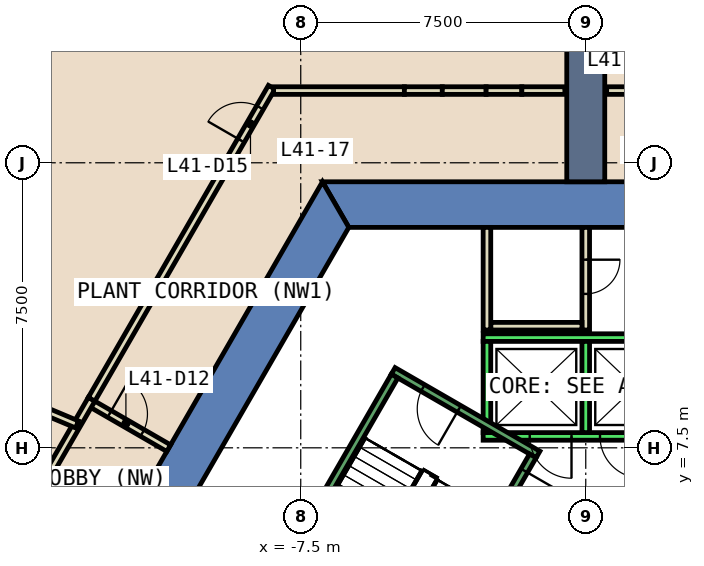
"""IFC4 building model, lengths in metres.
Left out: names, types, materials, properties, quantities, classifications, styles, units other than length and angle.
Written with IfcOpenShell. Run it as: python <this file> out.ifc"""

import sys

from ifc_helpers import new_model, si_unit, direction, frame, frame_2d, origin, place, context, subcontext, project, spatial, polyline, rectangle, outline, extrude, element, fill, save


model = new_model("IFC4")
c1 = context("Model", 3, precision=1e-05, world=origin(), true_north=direction((0.0, 1.0)))
c2 = subcontext(c1, "Body", "Model", "MODEL_VIEW")
j1 = project(units=[si_unit("LENGTHUNIT", "METRE"), si_unit("PLANEANGLEUNIT", "RADIAN")], contexts=[c1])
p1 = place(None, origin())
s1 = spatial("IfcSite", under=j1, at=p1, CompositionType="ELEMENT")
p2 = place(p1, origin())
s2 = spatial("IfcBuilding", under=s1, at=p2, CompositionType="ELEMENT")
p3 = place(p2, frame((0.0, 0.0, 184.4)))
s3 = spatial("IfcBuildingStorey", under=s2, at=p3, CompositionType="ELEMENT", Elevation=184.4)
p4 = place(p3, frame((0.0, 0.0, -0.6)))
e1 = element("IfcWall", 1, at=p4, inside=s3, PredefinedType="SHEAR", context=c2, shape_type="SweptSolid", body=[
    extrude(outline(polyline([(6.928, 14.5), (-6.928, 14.5), (-6.235, 13.3), (6.235, 13.3), (6.928, 14.5)])), origin(), (0.0, 0.0, 1.0), 5.4),
])
p5 = place(p3, frame((0.0, 0.0, -0.6)))
e2 = element("IfcWall", 2, at=p5, inside=s3, PredefinedType="SHEAR", context=c2, shape_type="SweptSolid", body=[
    extrude(outline(polyline([(-12.267, 5.252), (-11.228, 4.652), (-6.235, 13.3), (-6.928, 14.5), (-12.267, 5.252)])), origin(), (0.0, 0.0, 1.0), 5.4),
])
p6 = place(p3, frame((0.0, 14.5, 0.0), z_axis=(0.0, 0.0, 1.0), x_axis=(0.0, 1.0, 0.0)))
e3 = element("IfcWall", 3, at=p6, inside=s3, PredefinedType="SHEAR", context=c2, shape_type="SweptSolid", body=[
    extrude(rectangle(XDim=23.389, YDim=1.0, at=frame_2d((11.694, 0.0))), origin(), (0.0, 0.0, 1.0), 4.8),
])
p7 = place(p3, frame((0.0, 13.3, 0.0), z_axis=(0.0, 0.0, 1.0), x_axis=(0.0, -1.0, 0.0)))
e4 = element("IfcWall", 4, at=p7, inside=s3, PredefinedType="PARTITIONING", context=c2, shape_type="SweptSolid", body=[
    extrude(rectangle(XDim=2.7, YDim=0.2, at=frame_2d((1.35, 0.0))), origin(), (0.0, 0.0, 1.0), 4.8),
])
p8 = place(p7, frame((0.85, 0.0, 0.0)))
e5 = element("IfcOpeningElement", 5, at=p8, cuts=e4, PredefinedType="OPENING", context=c2, shape_type="SweptSolid", body=[
    extrude(rectangle(XDim=0.9, YDim=2.1, at=frame_2d((0.45, 1.05))), frame((0.0, 0.11, 0.0), z_axis=(0.0, -1.0, 0.0), x_axis=(1.0, 0.0, 0.0)), (0.0, 0.0, 1.0), 0.22),
])
p9 = place(p3, frame((-0.1, 10.7, 0.0), z_axis=(0.0, 0.0, 1.0), x_axis=(-1.0, 0.0, 0.0)))
e6 = element("IfcWall", 6, at=p9, inside=s3, PredefinedType="PARTITIONING", context=c2, shape_type="SweptSolid", body=[
    extrude(rectangle(XDim=2.4, YDim=0.2, at=frame_2d((1.2, 0.0))), origin(), (0.0, 0.0, 1.0), 4.8),
])
p10 = place(p3, frame((-2.6, 10.6, 0.0), z_axis=(0.0, 0.0, 1.0), x_axis=(0.0, 1.0, 0.0)))
e7 = element("IfcWall", 7, at=p10, inside=s3, PredefinedType="PARTITIONING", context=c2, shape_type="SweptSolid", body=[
    extrude(rectangle(XDim=2.7, YDim=0.2, at=frame_2d((1.35, 0.0))), origin(), (0.0, 0.0, 1.0), 4.8),
])
p11 = place(p3, frame((0.55, 16.9, 0.0), z_axis=(0.0, 0.0, 1.0), x_axis=(1.0, 0.0, 0.0)))
e8 = element("IfcWall", 8, at=p11, inside=s3, PredefinedType="PARTITIONING", context=c2, shape_type="SweptSolid", body=[
    extrude(rectangle(XDim=2.51, YDim=0.2, at=frame_2d((1.255, 0.0))), origin(), (0.0, 0.0, 1.0), 4.8),
])
p12 = place(p11, frame((0.83, 0.0, 0.0)))
e9 = element("IfcOpeningElement", 9, at=p12, cuts=e8, PredefinedType="OPENING", context=c2, shape_type="SweptSolid", body=[
    extrude(rectangle(XDim=1.0, YDim=2.1, at=frame_2d((0.5, 1.05))), frame((0.0, 0.11, 0.0), z_axis=(0.0, -1.0, 0.0), x_axis=(1.0, 0.0, 0.0)), (0.0, 0.0, 1.0), 0.22),
])
p13 = place(p3, frame((-13.053, 8.691, 0.0), z_axis=(0.0, 0.0, 1.0), x_axis=(0.865973769406, -0.500089422704, 0.0)))
e10 = element("IfcWall", 10, at=p13, inside=s3, PredefinedType="PARTITIONING", context=c2, shape_type="SweptSolid", body=[
    extrude(rectangle(XDim=2.399, YDim=0.2, at=frame_2d((1.2, 0.0))), origin(), (0.0, 0.0, 1.0), 4.8),
])
p14 = place(p13, frame((0.6, 0.0, 0.0)))
e11 = element("IfcOpeningElement", 11, at=p14, cuts=e10, PredefinedType="OPENING", context=c2, shape_type="SweptSolid", body=[
    extrude(rectangle(XDim=1.0, YDim=2.1, at=frame_2d((0.5, 1.05))), frame((0.0, 0.11, 0.0), z_axis=(0.0, -1.0, 0.0), x_axis=(1.0, 0.0, 0.0)), (0.0, 0.0, 1.0), 0.22),
])
p15 = place(p3, frame((-16.603, 2.542, 0.0), z_axis=(0.0, 0.0, 1.0), x_axis=(0.499968011863, 0.866043871356, 0.0)))
e12 = element("IfcWall", 12, at=p15, inside=s3, PredefinedType="PARTITIONING", context=c2, shape_type="SweptSolid", body=[
    extrude(rectangle(XDim=7.201, YDim=0.2, at=frame_2d((3.6, 0.0))), origin(), (0.0, 0.0, 1.0), 4.8),
])
p16 = place(p15, frame((2.654, 0.0, 0.0)))
e13 = element("IfcOpeningElement", 13, at=p16, cuts=e12, PredefinedType="OPENING", context=c2, shape_type="SweptSolid", body=[
    extrude(rectangle(XDim=1.0, YDim=2.1, at=frame_2d((0.5, 1.05))), frame((0.0, 0.11, 0.0), z_axis=(0.0, -1.0, 0.0), x_axis=(1.0, 0.0, 0.0)), (0.0, 0.0, 1.0), 0.22),
])
p17 = place(p3, frame((-13.003, 8.778, 0.0), z_axis=(0.0, 0.0, 1.0), x_axis=(0.499964736285, 0.866045762343, 0.0)))
e14 = element("IfcWall", 14, at=p17, inside=s3, PredefinedType="PARTITIONING", context=c2, shape_type="SweptSolid", body=[
    extrude(rectangle(XDim=9.479, YDim=0.2, at=frame_2d((4.739, 0.0))), origin(), (0.0, 0.0, 1.0), 4.8),
])
p18 = place(p17, frame((7.862, 0.0, 0.0)))
e15 = element("IfcOpeningElement", 15, at=p18, cuts=e14, PredefinedType="OPENING", context=c2, shape_type="SweptSolid", body=[
    extrude(rectangle(XDim=1.0, YDim=2.1, at=frame_2d((0.5, 1.05))), frame((0.0, 0.11, 0.0), z_axis=(0.0, -1.0, 0.0), x_axis=(1.0, 0.0, 0.0)), (0.0, 0.0, 1.0), 0.22),
])
p19 = place(p3, frame((-8.214, 16.9, 0.0), z_axis=(0.0, 0.0, 1.0), x_axis=(1.0, 0.0, 0.0)))
e16 = element("IfcWall", 16, at=p19, inside=s3, PredefinedType="PARTITIONING", context=c2, shape_type="SweptSolid", body=[
    extrude(rectangle(XDim=3.441, YDim=0.2, at=frame_2d((1.721, 0.0))), origin(), (0.0, 0.0, 1.0), 4.8),
])
p20 = place(p3, frame((-22.625, 11.99, 0.0), z_axis=(0.0, 0.0, 1.0), x_axis=(0.922173915382, -0.386775477233, 0.0)))
e17 = element("IfcWall", 17, at=p20, inside=s3, PredefinedType="PARTITIONING", context=c2, shape_type="SweptSolid", body=[
    extrude(rectangle(XDim=10.019, YDim=0.2, at=frame_2d((5.009, 0.0))), origin(), (0.0, 0.0, 1.0), 4.8),
])
p21 = place(p3, frame((-4.773, 16.9, 0.0), z_axis=(0.0, 0.0, 1.0), x_axis=(1.0, 0.0, 0.0)))
e18 = element("IfcWall", 18, at=p21, inside=s3, PredefinedType="PARTITIONING", context=c2, shape_type="SweptSolid", body=[
    extrude(rectangle(XDim=0.998, YDim=0.2, at=frame_2d((0.499, 0.0))), origin(), (0.0, 0.0, 1.0), 2.4),
])
p22 = place(p3, frame((-3.775, 16.9, 0.0), z_axis=(0.0, 0.0, 1.0), x_axis=(1.0, 0.0, 0.0)))
e19 = element("IfcWall", 19, at=p22, inside=s3, PredefinedType="PARTITIONING", context=c2, shape_type="SweptSolid", body=[
    extrude(rectangle(XDim=1.153, YDim=0.2, at=frame_2d((0.576, 0.0))), origin(), (0.0, 0.0, 1.0), 4.8),
])
p23 = place(p3, frame((-2.622, 16.9, 0.0), z_axis=(0.0, 0.0, 1.0), x_axis=(1.0, 0.0, 0.0)))
e20 = element("IfcWall", 20, at=p23, inside=s3, PredefinedType="PARTITIONING", context=c2, shape_type="SweptSolid", body=[
    extrude(rectangle(XDim=0.94, YDim=0.2, at=frame_2d((0.47, 0.0))), origin(), (0.0, 0.0, 1.0), 2.4),
])
p24 = place(p3, frame((-1.682, 16.9, 0.0), z_axis=(0.0, 0.0, 1.0), x_axis=(1.0, 0.0, 0.0)))
e21 = element("IfcWall", 21, at=p24, inside=s3, PredefinedType="PARTITIONING", context=c2, shape_type="SweptSolid", body=[
    extrude(rectangle(XDim=1.132, YDim=0.2, at=frame_2d((0.566, 0.0))), origin(), (0.0, 0.0, 1.0), 4.8),
])
p25 = place(p3, frame((2.7, 7.8, 0.0), z_axis=(0.0, 0.0, 1.0), x_axis=(-1.0, 0.0, 0.0)))
e22 = element("IfcWall", 22, at=p25, inside=s3, PredefinedType="STANDARD", context=c2, shape_type="SweptSolid", body=[
    extrude(rectangle(XDim=5.4, YDim=0.2, at=frame_2d((2.7, 0.0))), origin(), (0.0, 0.0, 1.0), 4.8),
])
p26 = place(p25, frame((1.225, 0.0, 0.0)))
e23 = element("IfcOpeningElement", 23, at=p26, cuts=e22, PredefinedType="OPENING", context=c2, shape_type="SweptSolid", body=[
    extrude(rectangle(XDim=1.1, YDim=2.1, at=frame_2d((0.55, 1.05))), frame((0.0, 0.11, 0.0), z_axis=(0.0, -1.0, 0.0), x_axis=(1.0, 0.0, 0.0)), (0.0, 0.0, 1.0), 0.22),
])
p27 = place(p25, frame((3.075, 0.0, 0.0)))
e24 = element("IfcOpeningElement", 24, at=p27, cuts=e22, PredefinedType="OPENING", context=c2, shape_type="SweptSolid", body=[
    extrude(rectangle(XDim=1.1, YDim=2.1, at=frame_2d((0.55, 1.05))), frame((0.0, 0.11, 0.0), z_axis=(0.0, -1.0, 0.0), x_axis=(1.0, 0.0, 0.0)), (0.0, 0.0, 1.0), 0.22),
])
p28 = place(p3, frame((2.7, 10.4, 0.0), z_axis=(0.0, 0.0, 1.0), x_axis=(-1.0, 0.0, 0.0)))
e25 = element("IfcWall", 25, at=p28, inside=s3, PredefinedType="STANDARD", context=c2, shape_type="SweptSolid", body=[
    extrude(rectangle(XDim=5.4, YDim=0.2, at=frame_2d((2.7, 0.0))), origin(), (0.0, 0.0, 1.0), 4.8),
])
for number, where, z_axis, x_axis in (
    (26, (0.0, 7.9, 0.0), (0.0, 0.0, 1.0), (0.0, 1.0, 0.0)),
    (27, (-2.6, 7.9, 0.0), (0.0, 0.0, 1.0), (0.0, 1.0, 0.0)),
):
    element("IfcWall", number, at=place(p3, frame(where, z_axis=z_axis, x_axis=x_axis)), inside=s3, PredefinedType="STANDARD", context=c2, shape_type="SweptSolid", body=[
        extrude(rectangle(XDim=2.4, YDim=0.2, at=frame_2d((1.2, 0.0))), origin(), (0.0, 0.0, 1.0), 4.8),
    ])
p29 = place(p3, frame((-1.256, 7.324, 0.0), z_axis=(0.0, 0.0, 1.0), x_axis=(-0.866046073146, 0.499964197906, 0.0)))
e28 = element("IfcWall", 28, at=p29, inside=s3, PredefinedType="STANDARD", context=c2, shape_type="SweptSolid", body=[
    extrude(rectangle(XDim=4.4, YDim=0.2, at=frame_2d((2.2, 0.0))), origin(), (0.0, 0.0, 1.0), 4.8),
])
p30 = place(p29, frame((2.4, 0.0, 0.0)))
e29 = element("IfcOpeningElement", 29, at=p30, cuts=e28, PredefinedType="OPENING", context=c2, shape_type="SweptSolid", body=[
    extrude(rectangle(XDim=1.1, YDim=2.2, at=frame_2d((0.55, 1.1))), frame((0.0, 0.11, 0.0), z_axis=(0.0, -1.0, 0.0), x_axis=(1.0, 0.0, 0.0)), (0.0, 0.0, 1.0), 0.22),
])
p31 = place(p3, frame((-1.393, 7.288, 0.0), z_axis=(0.0, 0.0, 1.0), x_axis=(-0.499963383562, -0.866046543262, 0.0)))
e30 = element("IfcWall", 30, at=p31, inside=s3, PredefinedType="STANDARD", context=c2, shape_type="SweptSolid", body=[
    extrude(rectangle(XDim=6.9, YDim=0.2, at=frame_2d((3.45, 0.0))), origin(), (0.0, 0.0, 1.0), 4.8),
])
p32 = place(p31, frame((0.45, 0.0, 0.0)))
e31 = element("IfcOpeningElement", 31, at=p32, cuts=e30, PredefinedType="OPENING", context=c2, shape_type="SweptSolid", body=[
    extrude(rectangle(XDim=1.1, YDim=2.2, at=frame_2d((0.55, 1.1))), frame((0.0, 0.11, 0.0), z_axis=(0.0, -1.0, 0.0), x_axis=(1.0, 0.0, 0.0)), (0.0, 0.0, 1.0), 0.22),
])
p33 = place(p3, frame((-5.03, 9.388, 0.0), z_axis=(0.0, 0.0, 1.0), x_axis=(-0.499978703459, -0.866037698999, 0.0)))
e32 = element("IfcWall", 32, at=p33, inside=s3, PredefinedType="STANDARD", context=c2, shape_type="SweptSolid", body=[
    extrude(rectangle(XDim=6.9, YDim=0.2, at=frame_2d((3.45, 0.0))), origin(), (0.0, 0.0, 1.0), 4.8),
])
p34 = place(p14, origin())
e33 = element("IfcDoor", 33, at=p34, inside=s3, OperationType="SINGLE_SWING_RIGHT", PredefinedType="DOOR", context=c2, shape_type="SweptSolid", body=[
    extrude(rectangle(XDim=1.0, YDim=2.1, at=frame_2d((0.5, 1.05))), frame((0.0, 0.025, 0.0), z_axis=(0.0, -1.0, 0.0), x_axis=(1.0, 0.0, 0.0)), (0.0, 0.0, 1.0), 0.05),
])
fill(e11, e33)
p35 = place(p18, origin())
e34 = element("IfcDoor", 34, at=p35, inside=s3, OperationType="SINGLE_SWING_LEFT", PredefinedType="DOOR", context=c2, shape_type="SweptSolid", body=[
    extrude(rectangle(XDim=1.0, YDim=2.1, at=frame_2d((0.5, 1.05))), frame((0.0, 0.025, 0.0), z_axis=(0.0, -1.0, 0.0), x_axis=(1.0, 0.0, 0.0)), (0.0, 0.0, 1.0), 0.05),
])
fill(e15, e34)
p36 = place(p8, origin())
e35 = element("IfcDoor", 35, at=p36, inside=s3, OperationType="SINGLE_SWING_RIGHT", PredefinedType="DOOR", context=c2, shape_type="SweptSolid", body=[
    extrude(rectangle(XDim=0.9, YDim=2.1, at=frame_2d((0.45, 1.05))), frame((0.0, 0.025, 0.0), z_axis=(0.0, -1.0, 0.0), x_axis=(1.0, 0.0, 0.0)), (0.0, 0.0, 1.0), 0.05),
])
fill(e5, e35)
p37 = place(p26, origin())
e36 = element("IfcDoor", 36, at=p37, inside=s3, OperationType="SLIDING_TO_LEFT", PredefinedType="DOOR", context=c2, shape_type="SweptSolid", body=[
    extrude(rectangle(XDim=1.1, YDim=2.1, at=frame_2d((0.55, 1.05))), frame((0.0, 0.025, 0.0), z_axis=(0.0, -1.0, 0.0), x_axis=(1.0, 0.0, 0.0)), (0.0, 0.0, 1.0), 0.05),
])
fill(e23, e36)
p38 = place(p27, origin())
e37 = element("IfcDoor", 37, at=p38, inside=s3, OperationType="SLIDING_TO_LEFT", PredefinedType="DOOR", context=c2, shape_type="SweptSolid", body=[
    extrude(rectangle(XDim=1.1, YDim=2.1, at=frame_2d((0.55, 1.05))), frame((0.0, 0.025, 0.0), z_axis=(0.0, -1.0, 0.0), x_axis=(1.0, 0.0, 0.0)), (0.0, 0.0, 1.0), 0.05),
])
fill(e24, e37)
p39 = place(p32, origin())
e38 = element("IfcDoor", 38, at=p39, inside=s3, OperationType="SINGLE_SWING_LEFT", PredefinedType="DOOR", context=c2, shape_type="SweptSolid", body=[
    extrude(rectangle(XDim=1.1, YDim=2.2, at=frame_2d((0.55, 1.1))), frame((0.0, 0.025, 0.0), z_axis=(0.0, -1.0, 0.0), x_axis=(1.0, 0.0, 0.0)), (0.0, 0.0, 1.0), 0.05),
])
fill(e31, e38)
p40 = place(p30, origin())
e39 = element("IfcDoor", 39, at=p40, inside=s3, OperationType="SINGLE_SWING_LEFT", PredefinedType="DOOR", context=c2, shape_type="SweptSolid", body=[
    extrude(rectangle(XDim=1.1, YDim=2.2, at=frame_2d((0.55, 1.1))), frame((0.0, 0.025, 0.0), z_axis=(0.0, -1.0, 0.0), x_axis=(1.0, 0.0, 0.0)), (0.0, 0.0, 1.0), 0.05),
])
fill(e29, e39)
save(model, sys.argv[1])
